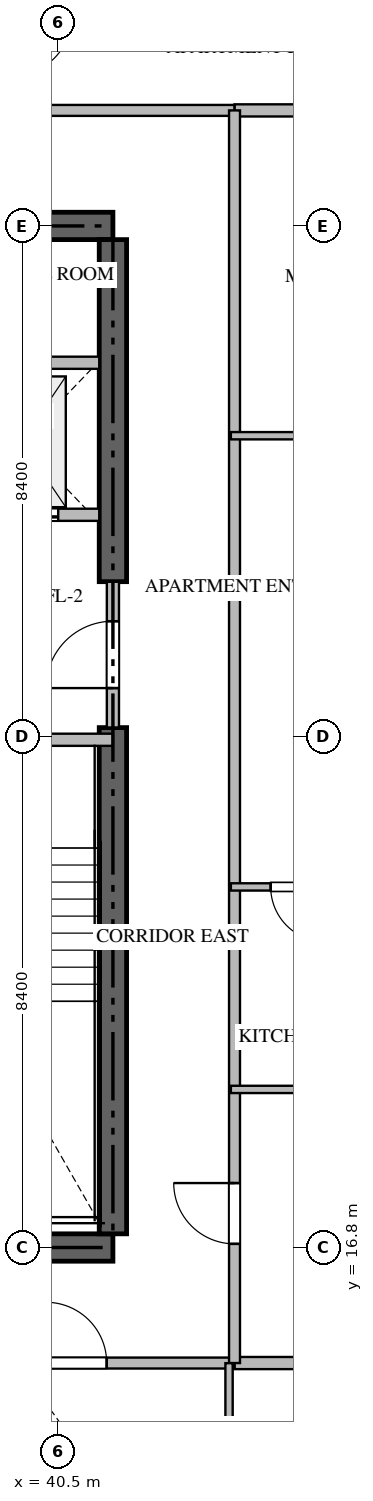
"""IFC4 building model, lengths in metres.
Left out: names, types, materials, properties, quantities, classifications, styles, units other than length and angle.
Written with IfcOpenShell. Run it as: python <this file> out.ifc"""

import sys

from ifc_helpers import new_model, si_unit, direction, frame, frame_2d, origin, place, context, subcontext, project, spatial, rectangle, extrude, source, transform, mapped, element, fill, save


model = new_model("IFC4")
c1 = context("Model", 3, precision=1e-05, world=origin(), true_north=direction((0.0, 1.0)))
c2 = subcontext(c1, "Body", "Model", "MODEL_VIEW")
j1 = project(units=[si_unit("LENGTHUNIT", "METRE"), si_unit("PLANEANGLEUNIT", "RADIAN")], contexts=[c1])
p1 = place(None, origin())
s1 = spatial("IfcSite", under=j1, at=p1, CompositionType="ELEMENT")
p2 = place(p1, origin())
s2 = spatial("IfcBuilding", under=s1, at=p2, CompositionType="ELEMENT")
p3 = place(p2, frame((0.0, 0.0, 64.2)))
s3 = spatial("IfcBuildingStorey", under=s2, at=p3, CompositionType="ELEMENT", Elevation=64.2)
for number, where, z_axis, x_axis in (
    (1, (23.4, 16.8, -0.26), (0.0, 0.0, 1.0), (1.0, 0.0, 0.0)),
    (2, (41.4, 33.6, -0.26), (0.0, 0.0, 1.0), (-1.0, 0.0, 0.0)),
):
    element("IfcWall", number, at=place(p3, frame(where, z_axis=z_axis, x_axis=x_axis)), inside=s3, PredefinedType="SHEAR", context=c2, shape_type="SweptSolid", body=[
        extrude(rectangle(XDim=18.0, YDim=0.45, at=frame_2d((9.0, 0.0))), origin(), (0.0, 0.0, 1.0), 3.748),
    ])
p4 = place(p3, frame((41.4, 17.025, -0.26), z_axis=(0.0, 0.0, 1.0), x_axis=(0.0, 1.0, 0.0)))
e3 = element("IfcWall", 3, at=p4, inside=s3, PredefinedType="SHEAR", context=c2, shape_type="SweptSolid", body=[
    extrude(rectangle(XDim=8.325, YDim=0.45, at=frame_2d((4.163, 0.0))), origin(), (0.0, 0.0, 1.0), 3.748),
])
p5 = place(p3, frame((41.4, 27.75, -0.26), z_axis=(0.0, 0.0, 1.0), x_axis=(0.0, 1.0, 0.0)))
e4 = element("IfcWall", 4, at=p5, inside=s3, PredefinedType="SHEAR", context=c2, shape_type="SweptSolid", body=[
    extrude(rectangle(XDim=5.625, YDim=0.45, at=frame_2d((2.812, 0.0))), origin(), (0.0, 0.0, 1.0), 3.748),
])
p6 = place(p3, frame((36.95, 25.15, 0.0), z_axis=(0.0, 0.0, 1.0), x_axis=(1.0, 0.0, 0.0)))
e5 = element("IfcWall", 5, at=p6, inside=s3, PredefinedType="STANDARD", context=c2, shape_type="SweptSolid", body=[
    extrude(rectangle(XDim=4.45, YDim=0.2, at=frame_2d((2.225, 0.0))), origin(), (0.0, 0.0, 1.0), 3.49),
])
p7 = place(p6, frame((1.65, 0.0, 0.0)))
e6 = element("IfcOpeningElement", 6, at=p7, cuts=e5, PredefinedType="OPENING", context=c2, shape_type="SweptSolid", body=[
    extrude(rectangle(XDim=1.1, YDim=2.15, at=frame_2d((0.55, 1.075))), frame((0.0, 0.11, 0.0), z_axis=(0.0, -1.0, 0.0), x_axis=(1.0, 0.0, 0.0)), (0.0, 0.0, 1.0), 0.22),
])
p8 = place(p3, frame((38.75, 28.85, 0.0), z_axis=(0.0, 0.0, 1.0), x_axis=(1.0, 0.0, 0.0)))
e7 = element("IfcWall", 7, at=p8, inside=s3, PredefinedType="STANDARD", context=c2, shape_type="SweptSolid", body=[
    extrude(rectangle(XDim=2.425, YDim=0.2, at=frame_2d((1.212, 0.0))), origin(), (0.0, 0.0, 1.0), 3.49),
])
p9 = place(p8, frame((0.55, 0.0, 0.0)))
e8 = element("IfcOpeningElement", 8, at=p9, cuts=e7, PredefinedType="OPENING", context=c2, shape_type="SweptSolid", body=[
    extrude(rectangle(XDim=1.2, YDim=2.2, at=frame_2d((0.6, 1.1))), frame((0.0, 0.11, 0.0), z_axis=(0.0, -1.0, 0.0), x_axis=(1.0, 0.0, 0.0)), (0.0, 0.0, 1.0), 0.22),
])
p10 = place(p3, frame((38.75, 31.35, 0.0), z_axis=(0.0, 0.0, 1.0), x_axis=(1.0, 0.0, 0.0)))
e9 = element("IfcWall", 9, at=p10, inside=s3, PredefinedType="STANDARD", context=c2, shape_type="SweptSolid", body=[
    extrude(rectangle(XDim=2.425, YDim=0.2, at=frame_2d((1.212, 0.0))), origin(), (0.0, 0.0, 1.0), 3.49),
])
p11 = place(p3, frame((41.4, 25.352, 0.0), z_axis=(0.0, 0.0, 1.0), x_axis=(0.0, 1.0, 0.0)))
e10 = element("IfcWall", 10, at=p11, inside=s3, PredefinedType="STANDARD", context=c2, shape_type="SweptSolid", body=[
    extrude(rectangle(XDim=2.396, YDim=0.2, at=frame_2d((1.198, 0.0))), origin(), (0.0, 0.0, 1.0), 3.49),
])
p12 = place(p11, frame((0.648, 0.0, 0.0)))
e11 = element("IfcOpeningElement", 11, at=p12, cuts=e10, PredefinedType="OPENING", context=c2, shape_type="SweptSolid", body=[
    extrude(rectangle(XDim=1.1, YDim=2.15, at=frame_2d((0.55, 1.075))), frame((0.0, 0.11, 0.0), z_axis=(0.0, -1.0, 0.0), x_axis=(1.0, 0.0, 0.0)), (0.0, 0.0, 1.0), 0.22),
])
for number, where, z_axis, x_axis in (
    (12, (43.4, 14.9, 0.0), (0.0, 0.0, 1.0), (1.0, 0.0, 0.0)),
    (13, (43.4, 35.5, 0.0), (0.0, 0.0, 1.0), (1.0, 0.0, 0.0)),
):
    element("IfcWall", number, at=place(p3, frame(where, z_axis=z_axis, x_axis=x_axis)), inside=s3, PredefinedType="PARTITIONING", context=c2, shape_type="SweptSolid", body=[
        extrude(rectangle(XDim=15.318, YDim=0.2, at=frame_2d((7.659, 0.0))), origin(), (0.0, 0.0, 1.0), 3.49),
    ])
p13 = place(p3, frame((21.402, 14.9, 0.0), z_axis=(0.0, 0.0, 1.0), x_axis=(1.0, 0.0, 0.0)))
e14 = element("IfcWall", 14, at=p13, inside=s3, PredefinedType="PARTITIONING", context=c2, shape_type="SweptSolid", body=[
    extrude(rectangle(XDim=21.996, YDim=0.18, at=frame_2d((10.998, 0.0))), origin(), (0.0, 0.0, 1.0), 3.49),
])
p14 = place(p13, frame((2.1, 0.0, 0.0)))
e15 = element("IfcOpeningElement", 15, at=p14, cuts=e14, PredefinedType="OPENING", context=c2, shape_type="SweptSolid", body=[
    extrude(rectangle(XDim=1.0, YDim=2.15, at=frame_2d((0.5, 1.075))), frame((0.0, 0.1, 0.0), z_axis=(0.0, -1.0, 0.0), x_axis=(1.0, 0.0, 0.0)), (0.0, 0.0, 1.0), 0.2),
])
p15 = place(p13, frame((6.719, 0.0, 0.0)))
e16 = element("IfcOpeningElement", 16, at=p15, cuts=e14, PredefinedType="OPENING", context=c2, shape_type="SweptSolid", body=[
    extrude(rectangle(XDim=1.0, YDim=2.15, at=frame_2d((0.5, 1.075))), frame((0.0, 0.1, 0.0), z_axis=(0.0, -1.0, 0.0), x_axis=(1.0, 0.0, 0.0)), (0.0, 0.0, 1.0), 0.2),
])
p16 = place(p13, frame((18.896, 0.0, 0.0)))
e17 = element("IfcOpeningElement", 17, at=p16, cuts=e14, PredefinedType="OPENING", context=c2, shape_type="SweptSolid", body=[
    extrude(rectangle(XDim=1.0, YDim=2.15, at=frame_2d((0.5, 1.075))), frame((0.0, 0.1, 0.0), z_axis=(0.0, -1.0, 0.0), x_axis=(1.0, 0.0, 0.0)), (0.0, 0.0, 1.0), 0.2),
])
p17 = place(p3, frame((21.402, 35.5, 0.0), z_axis=(0.0, 0.0, 1.0), x_axis=(1.0, 0.0, 0.0)))
e18 = element("IfcWall", 18, at=p17, inside=s3, PredefinedType="PARTITIONING", context=c2, shape_type="SweptSolid", body=[
    extrude(rectangle(XDim=21.996, YDim=0.18, at=frame_2d((10.998, 0.0))), origin(), (0.0, 0.0, 1.0), 3.49),
])
p18 = place(p17, frame((6.425, 0.0, 0.0)))
e19 = element("IfcOpeningElement", 19, at=p18, cuts=e18, PredefinedType="OPENING", context=c2, shape_type="SweptSolid", body=[
    extrude(rectangle(XDim=1.0, YDim=2.15, at=frame_2d((0.5, 1.075))), frame((0.0, 0.1, 0.0), z_axis=(0.0, -1.0, 0.0), x_axis=(1.0, 0.0, 0.0)), (0.0, 0.0, 1.0), 0.2),
])
p19 = place(p17, frame((13.605, 0.0, 0.0)))
e20 = element("IfcOpeningElement", 20, at=p19, cuts=e18, PredefinedType="OPENING", context=c2, shape_type="SweptSolid", body=[
    extrude(rectangle(XDim=1.0, YDim=2.15, at=frame_2d((0.5, 1.075))), frame((0.0, 0.1, 0.0), z_axis=(0.0, -1.0, 0.0), x_axis=(1.0, 0.0, 0.0)), (0.0, 0.0, 1.0), 0.2),
])
p20 = place(p3, frame((43.4, 14.9, 0.0), z_axis=(0.0, 0.0, 1.0), x_axis=(0.0, 1.0, 0.0)))
e21 = element("IfcWall", 21, at=p20, inside=s3, PredefinedType="PARTITIONING", context=c2, shape_type="SweptSolid", body=[
    extrude(rectangle(XDim=20.6, YDim=0.18, at=frame_2d((10.3, 0.0))), origin(), (0.0, 0.0, 1.0), 3.49),
])
p21 = place(p20, frame((1.96, 0.0, 0.0)))
e22 = element("IfcOpeningElement", 22, at=p21, cuts=e21, PredefinedType="OPENING", context=c2, shape_type="SweptSolid", body=[
    extrude(rectangle(XDim=1.0, YDim=2.15, at=frame_2d((0.5, 1.075))), frame((0.0, 0.1, 0.0), z_axis=(0.0, -1.0, 0.0), x_axis=(1.0, 0.0, 0.0)), (0.0, 0.0, 1.0), 0.2),
])
p22 = place(p3, frame((43.31, 12.15, 0.0), z_axis=(0.0, 0.0, 1.0), x_axis=(0.0, 1.0, 0.0)))
e23 = element("IfcWall", 23, at=p22, inside=s3, PredefinedType="PARTITIONING", context=c2, shape_type="SweptSolid", body=[
    extrude(rectangle(XDim=2.748, YDim=0.12, at=frame_2d((1.374, 0.0))), origin(), (0.0, 0.0, 1.0), 3.49),
])
p23 = place(p3, frame((46.15, 19.4, 0.0), z_axis=(0.0, 0.0, 1.0), x_axis=(-1.0, 0.0, 0.0)))
e24 = element("IfcWall", 24, at=p23, inside=s3, PredefinedType="PARTITIONING", context=c2, shape_type="SweptSolid", body=[
    extrude(rectangle(XDim=2.81, YDim=0.12, at=frame_2d((1.405, 0.0))), origin(), (0.0, 0.0, 1.0), 3.49),
])
p24 = place(p3, frame((45.55, 22.73, 0.0), z_axis=(0.0, 0.0, 1.0), x_axis=(-1.0, 0.0, 0.0)))
e25 = element("IfcWall", 25, at=p24, inside=s3, PredefinedType="PARTITIONING", context=c2, shape_type="SweptSolid", body=[
    extrude(rectangle(XDim=2.21, YDim=0.12, at=frame_2d((1.105, 0.0))), origin(), (0.0, 0.0, 1.0), 3.49),
])
p25 = place(p24, frame((0.655, 0.0, 0.0)))
e26 = element("IfcOpeningElement", 26, at=p25, cuts=e25, PredefinedType="OPENING", context=c2, shape_type="SweptSolid", body=[
    extrude(rectangle(XDim=0.9, YDim=2.1, at=frame_2d((0.45, 1.05))), frame((0.0, 0.07, 0.0), z_axis=(0.0, -1.0, 0.0), x_axis=(1.0, 0.0, 0.0)), (0.0, 0.0, 1.0), 0.14),
])
p26 = place(p3, frame((45.548, 30.15, 0.0), z_axis=(0.0, 0.0, 1.0), x_axis=(-1.0, 0.0, 0.0)))
e27 = element("IfcWall", 27, at=p26, inside=s3, PredefinedType="PARTITIONING", context=c2, shape_type="SweptSolid", body=[
    extrude(rectangle(XDim=2.208, YDim=0.12, at=frame_2d((1.104, 0.0))), origin(), (0.0, 0.0, 1.0), 3.49),
])
m1 = source(origin(), c2, "Body", "SweptSolid", [
    extrude(rectangle(XDim=1.2, YDim=2.2, at=frame_2d((0.6, 1.1))), frame((0.0, 0.025, 0.0), z_axis=(0.0, -1.0, 0.0), x_axis=(1.0, 0.0, 0.0)), (0.0, 0.0, 1.0), 0.05),
])
p27 = place(p9, origin())
e28 = element("IfcDoor", 28, at=p27, inside=s3, OperationType="DOUBLE_DOOR_SLIDING", PredefinedType="DOOR", context=c2, shape_type="MappedRepresentation", body=[
    mapped(m1, transform((0.0, 0.0, 0.0), scale=1.0)),
])
fill(e8, e28)
m2 = source(origin(), c2, "Body", "SweptSolid", [
    extrude(rectangle(XDim=1.1, YDim=2.15, at=frame_2d((0.55, 1.075))), frame((0.0, 0.025, 0.0), z_axis=(0.0, -1.0, 0.0), x_axis=(1.0, 0.0, 0.0)), (0.0, 0.0, 1.0), 0.05),
])
p28 = place(p12, origin())
e29 = element("IfcDoor", 29, at=p28, inside=s3, OperationType="SINGLE_SWING_LEFT", PredefinedType="DOOR", context=c2, shape_type="MappedRepresentation", body=[
    mapped(m2, transform((0.0, 0.0, 0.0), scale=1.0)),
])
fill(e11, e29)
m3 = source(origin(), c2, "Body", "SweptSolid", [
    extrude(rectangle(XDim=1.0, YDim=2.15, at=frame_2d((0.5, 1.075))), frame((0.0, 0.025, 0.0), z_axis=(0.0, -1.0, 0.0), x_axis=(1.0, 0.0, 0.0)), (0.0, 0.0, 1.0), 0.05),
])
p29 = place(p16, origin())
e30 = element("IfcDoor", 30, at=p29, inside=s3, OperationType="SINGLE_SWING_LEFT", PredefinedType="DOOR", context=c2, shape_type="MappedRepresentation", body=[
    mapped(m3, transform((0.0, 0.0, 0.0), scale=1.0)),
])
fill(e17, e30)
p30 = place(p21, origin())
e31 = element("IfcDoor", 31, at=p30, inside=s3, OperationType="SINGLE_SWING_RIGHT", PredefinedType="DOOR", context=c2, shape_type="MappedRepresentation", body=[
    mapped(m3, transform((0.0, 0.0, 0.0), scale=1.0)),
])
fill(e22, e31)
m4 = source(origin(), c2, "Body", "SweptSolid", [
    extrude(rectangle(XDim=0.9, YDim=2.1, at=frame_2d((0.45, 1.05))), frame((0.0, 0.025, 0.0), z_axis=(0.0, -1.0, 0.0), x_axis=(1.0, 0.0, 0.0)), (0.0, 0.0, 1.0), 0.05),
])
p31 = place(p25, origin())
e32 = element("IfcDoor", 32, at=p31, inside=s3, OperationType="SINGLE_SWING_LEFT", PredefinedType="DOOR", context=c2, shape_type="MappedRepresentation", body=[
    mapped(m4, transform((0.0, 0.0, 0.0), scale=1.0)),
])
fill(e26, e32)
save(model, sys.argv[1])
